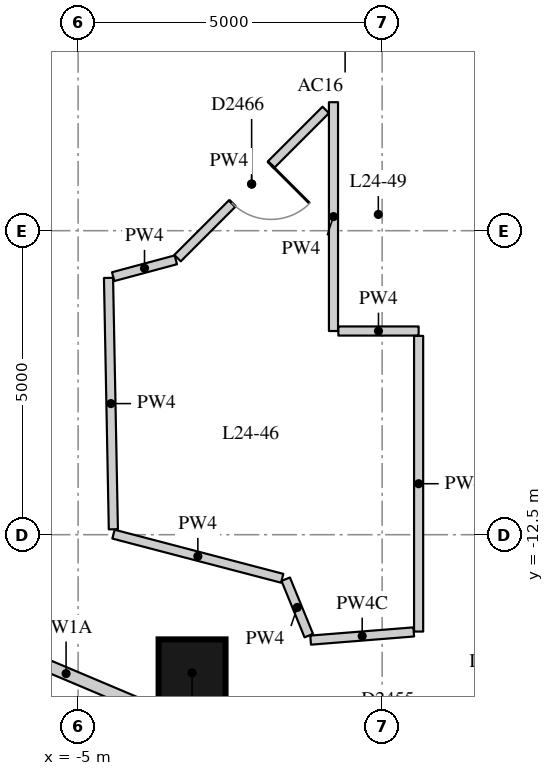
"""IFC4 building model, lengths in metres.
Left out: names, types, materials, properties, quantities, classifications, styles, units other than length and angle.
Written with IfcOpenShell. Run it as: python <this file> out.ifc"""

import sys

from ifc_helpers import new_model, si_unit, direction, frame, frame_2d, origin, origin_2d, place, context, subcontext, project, spatial, rectangle, extrude, element, fill, save


model = new_model("IFC4")
c1 = context("Model", 3, precision=1e-05, world=origin(), true_north=direction((0.0, 1.0)))
c2 = subcontext(c1, "Body", "Model", "MODEL_VIEW")
j1 = project(units=[si_unit("LENGTHUNIT", "METRE"), si_unit("PLANEANGLEUNIT", "RADIAN")], contexts=[c1])
p1 = place(None, origin())
s1 = spatial("IfcSite", under=j1, at=p1, CompositionType="ELEMENT")
p2 = place(p1, origin())
s2 = spatial("IfcBuilding", under=s1, at=p2, CompositionType="ELEMENT")
p3 = place(p2, frame((0.0, 0.0, 88.9)))
s3 = spatial("IfcBuildingStorey", under=s2, at=p3, CompositionType="ELEMENT", Elevation=88.9)
p4 = place(p3, frame((-3.126, -14.772, 0.0), z_axis=(0.0, 0.0, 1.0), x_axis=(1.0, 0.0, 0.0)))
e1 = element("IfcColumn", 1, at=p4, inside=s3, PredefinedType="COLUMN", context=c2, shape_type="SweptSolid", body=[
    extrude(rectangle(XDim=1.1, YDim=1.1, at=origin_2d()), origin(), (0.0, 0.0, 1.0), 3.3),
])
p5 = place(p3, frame((7.158, -15.178, 0.0), z_axis=(0.0, 0.0, 1.0), x_axis=(-0.996871915552, -0.0790340685, 0.0)))
e2 = element("IfcWall", 2, at=p5, inside=s3, PredefinedType="PARTITIONING", context=c2, shape_type="SweptSolid", body=[
    extrude(rectangle(XDim=9.647, YDim=0.2, at=frame_2d((4.824, 0.0))), origin(), (0.0, 0.0, 1.0), 3.02),
])
p6 = place(p5, frame((6.588, 0.0, 0.0)))
e3 = element("IfcOpeningElement", 3, at=p6, cuts=e2, PredefinedType="OPENING", context=c2, shape_type="SweptSolid", body=[
    extrude(rectangle(XDim=1.0, YDim=2.1, at=frame_2d((0.5, 1.05))), frame((0.0, 0.11, 0.0), z_axis=(0.0, -1.0, 0.0), x_axis=(1.0, 0.0, 0.0)), (0.0, 0.0, 1.0), 0.22),
])
p7 = place(p5, frame((4.855, 0.0, 0.0)))
e4 = element("IfcOpeningElement", 4, at=p7, cuts=e2, PredefinedType="OPENING", context=c2, shape_type="SweptSolid", body=[
    extrude(rectangle(XDim=0.9, YDim=2.1, at=frame_2d((0.45, 1.05))), frame((0.0, 0.11, 0.0), z_axis=(0.0, -1.0, 0.0), x_axis=(1.0, 0.0, 0.0)), (0.0, 0.0, 1.0), 0.22),
])
p8 = place(p5, frame((0.22, 0.0, 0.0)))
e5 = element("IfcOpeningElement", 5, at=p8, cuts=e2, PredefinedType="OPENING", context=c2, shape_type="SweptSolid", body=[
    extrude(rectangle(XDim=1.1, YDim=2.1, at=frame_2d((0.55, 1.05))), frame((0.0, 0.11, 0.0), z_axis=(0.0, -1.0, 0.0), x_axis=(1.0, 0.0, 0.0)), (0.0, 0.0, 1.0), 0.22),
])
p9 = place(p3, frame((-2.496, -15.925, 0.0), z_axis=(0.0, 0.0, 1.0), x_axis=(-0.921239287596, 0.388996368864, 0.0)))
e6 = element("IfcWall", 6, at=p9, inside=s3, PredefinedType="PARTITIONING", context=c2, shape_type="SweptSolid", body=[
    extrude(rectangle(XDim=5.866, YDim=0.2, at=frame_2d((2.933, 0.0))), origin(), (0.0, 0.0, 1.0), 2.57),
])
p10 = place(p3, frame((-0.8, -5.386, 0.0), z_axis=(0.0, 0.0, 1.0), x_axis=(0.0, -1.0, 0.0)))
e7 = element("IfcWall", 7, at=p10, inside=s3, PredefinedType="PARTITIONING", context=c2, shape_type="SweptSolid", body=[
    extrude(rectangle(XDim=3.763, YDim=0.15, at=frame_2d((1.882, 0.0))), origin(), (0.0, 0.0, 1.0), 3.02),
])
p11 = place(p3, frame((-0.72, -9.15, 0.0), z_axis=(0.0, 0.0, 1.0), x_axis=(1.0, 0.0, 0.0)))
e8 = element("IfcWall", 8, at=p11, inside=s3, PredefinedType="PARTITIONING", context=c2, shape_type="SweptSolid", body=[
    extrude(rectangle(XDim=1.32, YDim=0.15, at=frame_2d((0.66, 0.0))), origin(), (0.0, 0.0, 1.0), 3.02),
])
p12 = place(p3, frame((0.6, -9.23, 0.0), z_axis=(0.0, 0.0, 1.0), x_axis=(0.0, -1.0, 0.0)))
e9 = element("IfcWall", 9, at=p12, inside=s3, PredefinedType="PARTITIONING", context=c2, shape_type="SweptSolid", body=[
    extrude(rectangle(XDim=4.863, YDim=0.15, at=frame_2d((2.432, 0.0))), origin(), (0.0, 0.0, 1.0), 3.02),
])
p13 = place(p3, frame((0.52, -14.099, 0.0), z_axis=(0.0, 0.0, 1.0), x_axis=(-0.99684577893, -0.079363045745, 0.0)))
e10 = element("IfcWall", 10, at=p13, inside=s3, PredefinedType="PARTITIONING", context=c2, shape_type="SweptSolid", body=[
    extrude(rectangle(XDim=1.701, YDim=0.15, at=frame_2d((0.851, 0.0))), origin(), (0.0, 0.0, 1.0), 2.42),
])
p14 = place(p3, frame((-1.206, -14.16, 0.0), z_axis=(0.0, 0.0, 1.0), x_axis=(-0.378813066595, 0.925473209, 0.0)))
e11 = element("IfcWall", 11, at=p14, inside=s3, PredefinedType="PARTITIONING", context=c2, shape_type="SweptSolid", body=[
    extrude(rectangle(XDim=1.002, YDim=0.15, at=frame_2d((0.501, 0.0))), origin(), (0.0, 0.0, 1.0), 3.02),
])
p15 = place(p3, frame((-1.644, -13.217, 0.0), z_axis=(0.0, 0.0, 1.0), x_axis=(-0.967446197993, 0.253076774891, 0.0)))
e12 = element("IfcWall", 12, at=p15, inside=s3, PredefinedType="PARTITIONING", context=c2, shape_type="SweptSolid", body=[
    extrude(rectangle(XDim=2.868, YDim=0.15, at=frame_2d((1.434, 0.0))), origin(), (0.0, 0.0, 1.0), 3.02),
])
p16 = place(p3, frame((-4.42, -12.411, 0.0), z_axis=(0.0, 0.0, 1.0), x_axis=(-0.01930438501, 0.999813652997, 0.0)))
e13 = element("IfcWall", 13, at=p16, inside=s3, PredefinedType="PARTITIONING", context=c2, shape_type="SweptSolid", body=[
    extrude(rectangle(XDim=4.135, YDim=0.15, at=frame_2d((2.068, 0.0))), origin(), (0.0, 0.0, 1.0), 3.02),
])
p17 = place(p3, frame((-4.423, -8.256, 0.0), z_axis=(0.0, 0.0, 1.0), x_axis=(0.965880568435, 0.258987890683, 0.0)))
e14 = element("IfcWall", 14, at=p17, inside=s3, PredefinedType="PARTITIONING", context=c2, shape_type="SweptSolid", body=[
    extrude(rectangle(XDim=1.066, YDim=0.15, at=frame_2d((0.533, 0.0))), origin(), (0.0, 0.0, 1.0), 3.02),
])
p18 = place(p3, frame((-3.365, -7.951, 0.0), z_axis=(0.0, 0.0, 1.0), x_axis=(0.707106781187, 0.707106781187, 0.0)))
e15 = element("IfcWall", 15, at=p18, inside=s3, PredefinedType="PARTITIONING", context=c2, shape_type="SweptSolid", body=[
    extrude(rectangle(XDim=3.447, YDim=0.15, at=frame_2d((1.723, 0.0))), origin(), (0.0, 0.0, 1.0), 3.02),
])
p19 = place(p18, frame((1.273, 0.0, 0.0)))
e16 = element("IfcOpeningElement", 16, at=p19, cuts=e15, PredefinedType="OPENING", context=c2, shape_type="SweptSolid", body=[
    extrude(rectangle(XDim=0.9, YDim=2.1, at=frame_2d((0.45, 1.05))), frame((0.0, 0.085, 0.0), z_axis=(0.0, -1.0, 0.0), x_axis=(1.0, 0.0, 0.0)), (0.0, 0.0, 1.0), 0.17),
])
p20 = place(p3, frame((-4.073, -3.927, 0.0), z_axis=(0.0, 0.0, 1.0), x_axis=(-0.923860025149, -0.382730523909, 0.0)))
e17 = element("IfcWall", 17, at=p20, inside=s3, PredefinedType="PARTITIONING", context=c2, shape_type="SweptSolid", body=[
    extrude(rectangle(XDim=4.251, YDim=0.1, at=frame_2d((2.125, 0.0))), origin(), (0.0, 0.0, 1.0), 3.02),
])
p21 = place(p19, origin())
e18 = element("IfcDoor", 18, at=p21, inside=s3, OperationType="SINGLE_SWING_LEFT", PredefinedType="DOOR", context=c2, shape_type="SweptSolid", body=[
    extrude(rectangle(XDim=0.9, YDim=2.1, at=frame_2d((0.45, 1.05))), frame((0.0, 0.025, 0.0), z_axis=(0.0, -1.0, 0.0), x_axis=(1.0, 0.0, 0.0)), (0.0, 0.0, 1.0), 0.05),
])
fill(e16, e18)
save(model, sys.argv[1])
